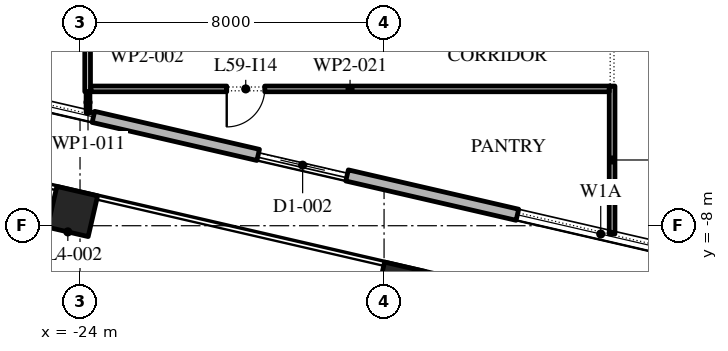
"""IFC4 building model, lengths in metres.
Left out: names, types, materials, properties, quantities, classifications, styles, units other than length and angle.
Written with IfcOpenShell. Run it as: python <this file> out.ifc"""

import sys

from ifc_helpers import new_model, si_unit, direction, frame, frame_2d, origin, origin_2d, place, context, subcontext, project, spatial, rectangle, extrude, element, fill, save


model = new_model("IFC4")
c1 = context("Model", 3, precision=1e-05, world=origin(), true_north=direction((0.0, 1.0)))
c2 = subcontext(c1, "Body", "Model", "MODEL_VIEW")
j1 = project(units=[si_unit("LENGTHUNIT", "METRE"), si_unit("PLANEANGLEUNIT", "RADIAN")], contexts=[c1])
p1 = place(None, origin())
s1 = spatial("IfcSite", under=j1, at=p1, CompositionType="ELEMENT")
p2 = place(p1, origin())
s2 = spatial("IfcBuilding", under=s1, at=p2, CompositionType="ELEMENT")
p3 = place(p2, frame((0.0, 0.0, 272.4)))
s3 = spatial("IfcBuildingStorey", under=s2, at=p3, CompositionType="ELEMENT", Elevation=272.4)
for number, where, z_axis, x_axis in (
    (1, (-24.197, -7.626, 0.0), (0.0, 0.0, 1.0), (0.974, -0.225, 0.0)),
    (2, (-15.574, -9.617, 0.0), (0.0, 0.0, 1.0), (0.974, -0.225, 0.0)),
):
    element("IfcColumn", number, at=place(p3, frame(where, z_axis=z_axis, x_axis=x_axis)), inside=s3, PredefinedType="COLUMN", context=c2, shape_type="SweptSolid", body=[
        extrude(rectangle(XDim=1.1, YDim=1.1, at=origin_2d()), origin(), (0.0, 0.0, 1.0), 4.2),
    ])
p4 = place(p3, frame((-29.616, -3.758, 0.0), z_axis=(0.0, 0.0, 1.0), x_axis=(0.974370532314, -0.224949029246, 0.0)))
e3 = element("IfcWall", 3, at=p4, inside=s3, PredefinedType="STANDARD", context=c2, shape_type="SweptSolid", body=[
    extrude(rectangle(XDim=48.0, YDim=0.3, at=frame_2d((24.0, 0.0))), origin(), (0.0, 0.0, 1.0), 4.0),
])
p5 = place(p4, frame((1.625, 0.0, 0.45)))
e4 = element("IfcOpeningElement", 4, at=p5, cuts=e3, PredefinedType="OPENING", context=c2, shape_type="SweptSolid", body=[
    extrude(rectangle(XDim=4.5, YDim=3.05, at=frame_2d((2.25, 1.525))), frame((0.0, 0.16, 0.0), z_axis=(0.0, -1.0, 0.0), x_axis=(1.0, 0.0, 0.0)), (0.0, 0.0, 1.0), 0.32),
])
p6 = place(p4, frame((10.575, 0.0, 0.0)))
e5 = element("IfcOpeningElement", 5, at=p6, cuts=e3, PredefinedType="OPENING", context=c2, shape_type="SweptSolid", body=[
    extrude(rectangle(XDim=2.4, YDim=3.5, at=frame_2d((1.2, 1.75))), frame((0.0, 0.16, 0.0), z_axis=(0.0, -1.0, 0.0), x_axis=(1.0, 0.0, 0.0)), (0.0, 0.0, 1.0), 0.32),
])
p7 = place(p4, frame((17.575, 0.0, 0.45)))
e6 = element("IfcOpeningElement", 6, at=p7, cuts=e3, PredefinedType="OPENING", context=c2, shape_type="SweptSolid", body=[
    extrude(rectangle(XDim=4.5, YDim=3.0, at=frame_2d((2.25, 1.5))), frame((0.0, 0.16, 0.0), z_axis=(0.0, -1.0, 0.0), x_axis=(1.0, 0.0, 0.0)), (0.0, 0.0, 1.0), 0.32),
])
p8 = place(p4, frame((25.625, 0.0, 0.45)))
e7 = element("IfcOpeningElement", 7, at=p8, cuts=e3, PredefinedType="OPENING", context=c2, shape_type="SweptSolid", body=[
    extrude(rectangle(XDim=4.5, YDim=2.95, at=frame_2d((2.25, 1.475))), frame((0.0, 0.16, 0.0), z_axis=(0.0, -1.0, 0.0), x_axis=(1.0, 0.0, 0.0)), (0.0, 0.0, 1.0), 0.32),
])
p9 = place(p4, frame((33.675, 0.0, 0.45)))
e8 = element("IfcOpeningElement", 8, at=p9, cuts=e3, PredefinedType="OPENING", context=c2, shape_type="SweptSolid", body=[
    extrude(rectangle(XDim=4.5, YDim=2.825, at=frame_2d((2.25, 1.413))), frame((0.0, 0.16, 0.0), z_axis=(0.0, -1.0, 0.0), x_axis=(1.0, 0.0, 0.0)), (0.0, 0.0, 1.0), 0.32),
])
p10 = place(p4, frame((42.175, 0.0, 0.0)))
e9 = element("IfcOpeningElement", 9, at=p10, cuts=e3, PredefinedType="OPENING", context=c2, shape_type="SweptSolid", body=[
    extrude(rectangle(XDim=2.4, YDim=3.5, at=frame_2d((1.2, 1.75))), frame((0.0, 0.16, 0.0), z_axis=(0.0, -1.0, 0.0), x_axis=(1.0, 0.0, 0.0)), (0.0, 0.0, 1.0), 0.32),
])
p11 = place(p3, frame((-23.8, -4.475, 0.0), z_axis=(0.0, 0.0, 1.0), x_axis=(0.0, 1.0, 0.0)))
e10 = element("IfcWall", 10, at=p11, inside=s3, PredefinedType="PARTITIONING", context=c2, shape_type="SweptSolid", body=[
    extrude(rectangle(XDim=4.935, YDim=0.15, at=frame_2d((2.468, 0.0))), origin(), (0.0, 0.0, 1.0), 4.0),
])
p12 = place(p11, frame((1.485, 0.0, 0.0)))
e11 = element("IfcOpeningElement", 11, at=p12, cuts=e10, PredefinedType="OPENING", context=c2, shape_type="SweptSolid", body=[
    extrude(rectangle(XDim=1.0, YDim=2.1, at=frame_2d((0.5, 1.05))), frame((0.0, 0.085, 0.0), z_axis=(0.0, -1.0, 0.0), x_axis=(1.0, 0.0, 0.0)), (0.0, 0.0, 1.0), 0.17),
])
p13 = place(p3, frame((-23.79, -5.032, 0.0), z_axis=(0.0, 0.0, 1.0), x_axis=(0.0, 1.0, 0.0)))
e12 = element("IfcWall", 12, at=p13, inside=s3, PredefinedType="PARTITIONING", context=c2, shape_type="SweptSolid", body=[
    extrude(rectangle(XDim=0.557, YDim=0.1, at=frame_2d((0.278, 0.0))), origin(), (0.0, 0.0, 1.0), 4.0),
])
p14 = place(p3, frame((-10.0, -8.216, 0.0), z_axis=(0.0, 0.0, 1.0), x_axis=(0.0, 1.0, 0.0)))
e13 = element("IfcWall", 13, at=p14, inside=s3, PredefinedType="PARTITIONING", context=c2, shape_type="SweptSolid", body=[
    extrude(rectangle(XDim=3.891, YDim=0.15, at=frame_2d((1.946, 0.0))), origin(), (0.0, 0.0, 1.0), 4.0),
])
p15 = place(p3, frame((-10.075, -4.4, 0.0), z_axis=(0.0, 0.0, 1.0), x_axis=(-1.0, 0.0, 0.0)))
e14 = element("IfcWall", 14, at=p15, inside=s3, PredefinedType="PARTITIONING", context=c2, shape_type="SweptSolid", body=[
    extrude(rectangle(XDim=13.64, YDim=0.15, at=frame_2d((6.82, 0.0))), origin(), (0.0, 0.0, 1.0), 4.0),
])
p16 = place(p15, frame((9.065, 0.0, 0.0)))
e15 = element("IfcOpeningElement", 15, at=p16, cuts=e14, PredefinedType="OPENING", context=c2, shape_type="SweptSolid", body=[
    extrude(rectangle(XDim=1.0, YDim=2.1, at=frame_2d((0.5, 1.05))), frame((0.0, 0.085, 0.0), z_axis=(0.0, -1.0, 0.0), x_axis=(1.0, 0.0, 0.0)), (0.0, 0.0, 1.0), 0.17),
])
p17 = place(p5, origin())
e16 = element("IfcWindow", 16, at=p17, inside=s3, PartitioningType="DOUBLE_PANEL_VERTICAL", PredefinedType="WINDOW", context=c2, shape_type="SweptSolid", body=[
    extrude(rectangle(XDim=4.5, YDim=3.05, at=frame_2d((2.25, 1.525))), frame((0.0, 0.03, 0.0), z_axis=(0.0, -1.0, 0.0), x_axis=(1.0, 0.0, 0.0)), (0.0, 0.0, 1.0), 0.06),
])
fill(e4, e16)
p18 = place(p6, origin())
e17 = element("IfcDoor", 17, at=p18, inside=s3, OperationType="DOUBLE_DOOR_SLIDING", PredefinedType="DOOR", context=c2, shape_type="SweptSolid", body=[
    extrude(rectangle(XDim=2.4, YDim=3.5, at=frame_2d((1.2, 1.75))), frame((0.0, 0.025, 0.0), z_axis=(0.0, -1.0, 0.0), x_axis=(1.0, 0.0, 0.0)), (0.0, 0.0, 1.0), 0.05),
])
fill(e5, e17)
p19 = place(p7, origin())
e18 = element("IfcWindow", 18, at=p19, inside=s3, PartitioningType="DOUBLE_PANEL_VERTICAL", PredefinedType="WINDOW", context=c2, shape_type="SweptSolid", body=[
    extrude(rectangle(XDim=4.5, YDim=3.0, at=frame_2d((2.25, 1.5))), frame((0.0, 0.03, 0.0), z_axis=(0.0, -1.0, 0.0), x_axis=(1.0, 0.0, 0.0)), (0.0, 0.0, 1.0), 0.06),
])
fill(e6, e18)
p20 = place(p16, origin())
e19 = element("IfcDoor", 19, at=p20, inside=s3, OperationType="SINGLE_SWING_LEFT", PredefinedType="DOOR", context=c2, shape_type="SweptSolid", body=[
    extrude(rectangle(XDim=1.0, YDim=2.1, at=frame_2d((0.5, 1.05))), frame((0.0, 0.025, 0.0), z_axis=(0.0, -1.0, 0.0), x_axis=(1.0, 0.0, 0.0)), (0.0, 0.0, 1.0), 0.05),
])
fill(e15, e19)
save(model, sys.argv[1])
